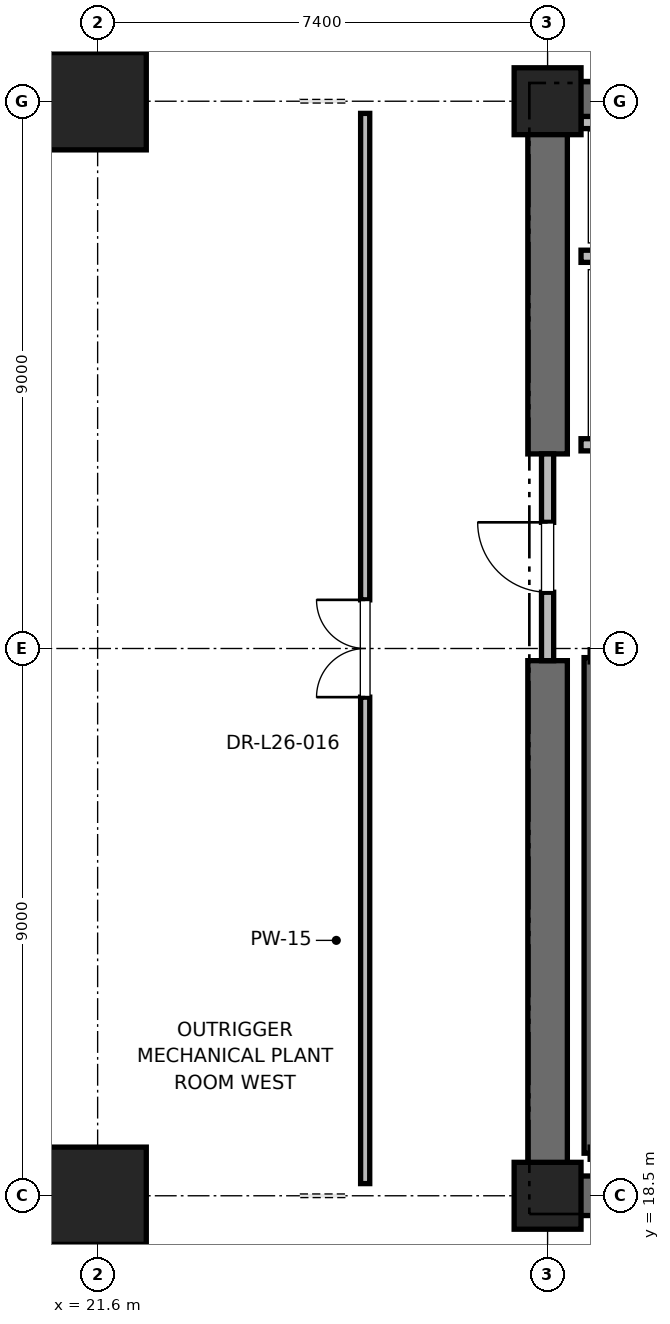
"""IFC4 building model, lengths in metres.
Left out: names, types, materials, properties, quantities, classifications, styles, units other than length and angle.
Written with IfcOpenShell. Run it as: python <this file> out.ifc"""

import sys

from ifc_helpers import new_model, si_unit, direction, frame, frame_2d, origin, origin_2d, place, context, subcontext, project, spatial, rectangle, extrude, element, fill, save


model = new_model("IFC4")
c1 = context("Model", 3, precision=1e-05, world=origin(), true_north=direction((0.0, 1.0)))
c2 = subcontext(c1, "Body", "Model", "MODEL_VIEW")
j1 = project(units=[si_unit("LENGTHUNIT", "METRE"), si_unit("PLANEANGLEUNIT", "RADIAN")], contexts=[c1])
p1 = place(None, origin())
s1 = spatial("IfcSite", under=j1, at=p1, CompositionType="ELEMENT")
p2 = place(p1, origin())
s2 = spatial("IfcBuilding", under=s1, at=p2, CompositionType="ELEMENT")
p3 = place(p2, frame((0.0, 0.0, 113.0)))
s3 = spatial("IfcBuildingStorey", under=s2, at=p3, CompositionType="ELEMENT", Elevation=113.0)
for number, where, z_axis, x_axis in (
    (1, (21.6, 18.5, 0.0), (0.0, 0.0, 1.0), (1.0, 0.0, 0.0)),
    (2, (21.6, 36.5, 0.0), (0.0, 0.0, 1.0), (1.0, 0.0, 0.0)),
):
    element("IfcColumn", number, at=place(p3, frame(where, z_axis=z_axis, x_axis=x_axis)), inside=s3, PredefinedType="COLUMN", context=c2, shape_type="SweptSolid", body=[
        extrude(rectangle(XDim=1.6, YDim=1.6, at=origin_2d()), origin(), (0.0, 0.0, 1.0), 5.4),
    ])
for number, where, z_axis, x_axis in (
    (3, (29.0, 18.5, 0.0), (0.0, 0.0, 1.0), (1.0, 0.0, 0.0)),
    (4, (29.0, 36.5, 0.0), (0.0, 0.0, 1.0), (1.0, 0.0, 0.0)),
):
    element("IfcColumn", number, at=place(p3, frame(where, z_axis=z_axis, x_axis=x_axis)), inside=s3, PredefinedType="PILASTER", context=c2, shape_type="SweptSolid", body=[
        extrude(rectangle(XDim=1.1, YDim=1.1, at=origin_2d()), origin(), (0.0, 0.0, 1.0), 5.4),
    ])
p4 = place(p3, frame((29.0, 18.5, 0.0), z_axis=(0.0, 0.0, 1.0), x_axis=(1.0, 0.0, 0.0)))
e5 = element("IfcWall", 5, at=p4, inside=s3, PredefinedType="SHEAR", context=c2, shape_type="SweptSolid", body=[
    extrude(rectangle(XDim=9.2, YDim=0.65, at=frame_2d((4.6, 0.0))), origin(), (0.0, 0.0, 1.0), 5.1),
])
p5 = place(p3, frame((29.0, 36.5, 0.0), z_axis=(0.0, 0.0, 1.0), x_axis=(1.0, 0.0, 0.0)))
e6 = element("IfcWall", 6, at=p5, inside=s3, PredefinedType="SHEAR", context=c2, shape_type="SweptSolid", body=[
    extrude(rectangle(XDim=5.8, YDim=0.65, at=frame_2d((2.9, 0.0))), origin(), (0.0, 0.0, 1.0), 5.1),
])
p6 = place(p3, frame((29.0, 18.5, 0.0), z_axis=(0.0, 0.0, 1.0), x_axis=(0.0, 1.0, 0.0)))
e7 = element("IfcWall", 7, at=p6, inside=s3, PredefinedType="SHEAR", context=c2, shape_type="SweptSolid", body=[
    extrude(rectangle(XDim=8.8, YDim=0.65, at=frame_2d((4.4, 0.0))), origin(), (0.0, 0.0, 1.0), 5.1),
])
p7 = place(p3, frame((29.0, 30.7, 0.0), z_axis=(0.0, 0.0, 1.0), x_axis=(0.0, 1.0, 0.0)))
e8 = element("IfcWall", 8, at=p7, inside=s3, PredefinedType="SHEAR", context=c2, shape_type="SweptSolid", body=[
    extrude(rectangle(XDim=5.8, YDim=0.65, at=frame_2d((2.9, 0.0))), origin(), (0.0, 0.0, 1.0), 5.1),
])
p8 = place(p3, frame((29.7, 19.2, 0.0), z_axis=(0.0, 0.0, 1.0), x_axis=(0.0, 1.0, 0.0)))
e9 = element("IfcWall", 9, at=p8, inside=s3, PredefinedType="SOLIDWALL", context=c2, shape_type="SweptSolid", body=[
    extrude(rectangle(XDim=8.15, YDim=0.2, at=frame_2d((4.075, 0.0))), origin(), (0.0, 0.0, 1.0), 5.1),
])
p9 = place(p3, frame((29.0, 27.3, 0.0), z_axis=(0.0, 0.0, 1.0), x_axis=(0.0, 1.0, 0.0)))
e10 = element("IfcWall", 10, at=p9, inside=s3, PredefinedType="PARTITIONING", context=c2, shape_type="SweptSolid", body=[
    extrude(rectangle(XDim=3.4, YDim=0.2, at=frame_2d((1.7, 0.0))), origin(), (0.0, 0.0, 1.0), 3.88),
])
p10 = place(p9, frame((1.125, 0.0, 0.0)))
e11 = element("IfcOpeningElement", 11, at=p10, cuts=e10, PredefinedType="OPENING", context=c2, shape_type="SweptSolid", body=[
    extrude(rectangle(XDim=1.15, YDim=2.2, at=frame_2d((0.575, 1.1))), frame((0.0, 0.1, 0.0), z_axis=(0.0, -1.0, 0.0), x_axis=(1.0, 0.0, 0.0)), (0.0, 0.0, 1.0), 0.2),
])
p11 = place(p3, frame((29.55, 30.85, 0.0), z_axis=(0.0, 0.0, 1.0), x_axis=(1.0, 0.0, 0.0)))
e12 = element("IfcWall", 12, at=p11, inside=s3, PredefinedType="SOLIDWALL", context=c2, shape_type="SweptSolid", body=[
    extrude(rectangle(XDim=2.6, YDim=0.2, at=frame_2d((1.3, 0.0))), origin(), (0.0, 0.0, 1.0), 3.88),
])
p12 = place(p11, frame((0.75, 0.0, 0.0)))
e13 = element("IfcOpeningElement", 13, at=p12, cuts=e12, PredefinedType="OPENING", context=c2, shape_type="SweptSolid", body=[
    extrude(rectangle(XDim=1.1, YDim=2.2, at=frame_2d((0.55, 1.1))), frame((0.0, 0.1, 0.0), z_axis=(0.0, -1.0, 0.0), x_axis=(1.0, 0.0, 0.0)), (0.0, 0.0, 1.0), 0.2),
])
p13 = place(p3, frame((29.55, 33.95, 0.0), z_axis=(0.0, 0.0, 1.0), x_axis=(1.0, 0.0, 0.0)))
e14 = element("IfcWall", 14, at=p13, inside=s3, PredefinedType="SOLIDWALL", context=c2, shape_type="SweptSolid", body=[
    extrude(rectangle(XDim=2.8, YDim=0.2, at=frame_2d((1.4, 0.0))), origin(), (0.0, 0.0, 1.0), 5.1),
])
p14 = place(p3, frame((32.35, 36.15, 0.0), z_axis=(0.0, 0.0, 1.0), x_axis=(-1.0, 0.0, 0.0)))
e15 = element("IfcWall", 15, at=p14, inside=s3, PredefinedType="SOLIDWALL", context=c2, shape_type="SweptSolid", body=[
    extrude(rectangle(XDim=2.8, YDim=0.2, at=frame_2d((1.4, 0.0))), origin(), (0.0, 0.0, 1.0), 4.153),
])
p15 = place(p3, frame((26.0, 18.7, 0.0), z_axis=(0.0, 0.0, 1.0), x_axis=(0.0, 1.0, 0.0)))
e16 = element("IfcWall", 16, at=p15, inside=s3, PredefinedType="PARTITIONING", context=c2, shape_type="SweptSolid", body=[
    extrude(rectangle(XDim=17.6, YDim=0.15, at=frame_2d((8.8, 0.0))), origin(), (0.0, 0.0, 1.0), 2.85),
])
p16 = place(p15, frame((8.0, 0.0, 0.0)))
e17 = element("IfcOpeningElement", 17, at=p16, cuts=e16, PredefinedType="OPENING", context=c2, shape_type="SweptSolid", body=[
    extrude(rectangle(XDim=1.6, YDim=2.25, at=frame_2d((0.8, 1.125))), frame((0.0, 0.075, 0.0), z_axis=(0.0, -1.0, 0.0), x_axis=(1.0, 0.0, 0.0)), (0.0, 0.0, 1.0), 0.15),
])
p17 = place(p10, origin())
e18 = element("IfcDoor", 18, at=p17, inside=s3, OperationType="SINGLE_SWING_RIGHT", PredefinedType="DOOR", context=c2, shape_type="SweptSolid", body=[
    extrude(rectangle(XDim=1.15, YDim=2.2, at=frame_2d((0.575, 1.1))), frame((0.0, 0.025, 0.0), z_axis=(0.0, -1.0, 0.0), x_axis=(1.0, 0.0, 0.0)), (0.0, 0.0, 1.0), 0.05),
])
fill(e11, e18)
p18 = place(p16, origin())
e19 = element("IfcDoor", 19, at=p18, inside=s3, OperationType="DOUBLE_DOOR_SINGLE_SWING", PredefinedType="DOOR", context=c2, shape_type="SweptSolid", body=[
    extrude(rectangle(XDim=1.6, YDim=2.25, at=frame_2d((0.8, 1.125))), frame((0.0, 0.025, 0.0), z_axis=(0.0, -1.0, 0.0), x_axis=(1.0, 0.0, 0.0)), (0.0, 0.0, 1.0), 0.05),
])
fill(e17, e19)
save(model, sys.argv[1])
